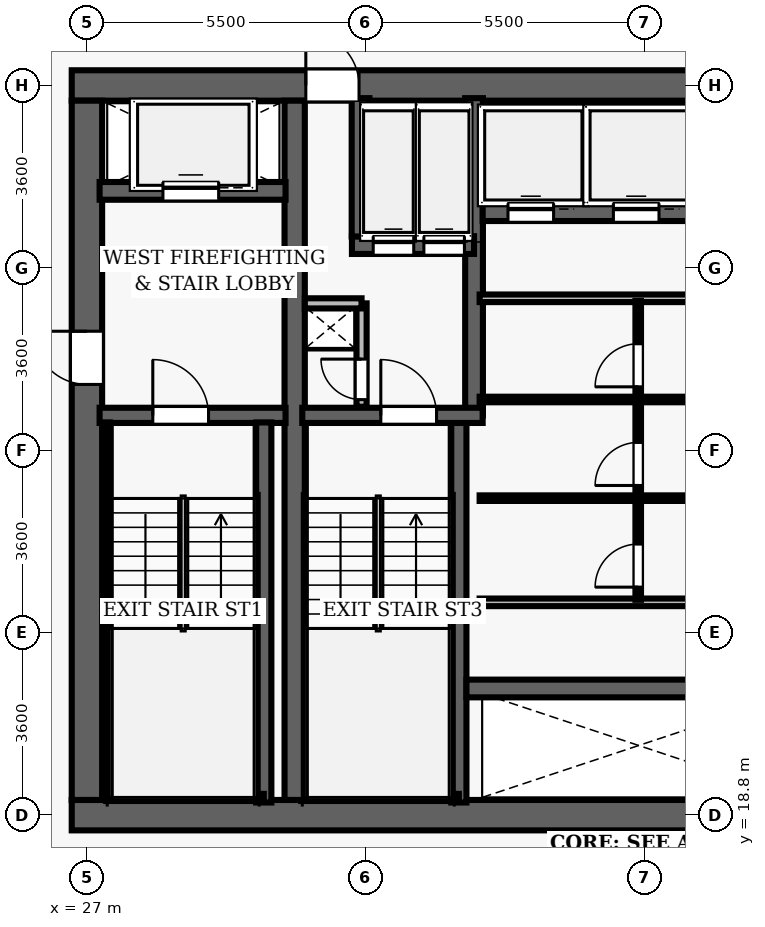
"""IFC4 building model, lengths in metres.
Left out: names, types, materials, properties, quantities, classifications, styles, units other than length and angle.
Written with IfcOpenShell. Run it as: python <this file> out.ifc"""

import sys

from ifc_helpers import new_model, si_unit, direction, frame, frame_2d, origin, place, context, subcontext, project, spatial, rectangle, extrude, element, fill, save


model = new_model("IFC4")
c1 = context("Model", 3, precision=1e-05, world=origin(), true_north=direction((0.0, 1.0)))
c2 = subcontext(c1, "Body", "Model", "MODEL_VIEW")
j1 = project(units=[si_unit("LENGTHUNIT", "METRE"), si_unit("PLANEANGLEUNIT", "RADIAN")], contexts=[c1])
p1 = place(None, origin())
s1 = spatial("IfcSite", under=j1, at=p1, CompositionType="ELEMENT")
p2 = place(p1, origin())
s2 = spatial("IfcBuilding", under=s1, at=p2, CompositionType="ELEMENT")
p3 = place(p2, frame((0.0, 0.0, 65.9)))
s3 = spatial("IfcBuildingStorey", under=s2, at=p3, CompositionType="ELEMENT", Elevation=65.9)
p4 = place(p3, frame((26.7, 18.8, 0.0), z_axis=(0.0, 0.0, 1.0), x_axis=(1.0, 0.0, 0.0)))
e1 = element("IfcWall", 1, at=p4, inside=s3, PredefinedType="SHEAR", context=c2, shape_type="SweptSolid", body=[
    extrude(rectangle(XDim=22.6, YDim=0.6, at=frame_2d((11.3, 0.0))), origin(), (0.0, 0.0, 1.0), 3.5),
])
p5 = place(p4, frame((14.52, 0.0, 0.0)))
e2 = element("IfcOpeningElement", 2, at=p5, cuts=e1, PredefinedType="OPENING", context=c2, shape_type="SweptSolid", body=[
    extrude(rectangle(XDim=1.05, YDim=2.15, at=frame_2d((0.525, 1.075))), frame((0.0, 0.31, 0.0), z_axis=(0.0, -1.0, 0.0), x_axis=(1.0, 0.0, 0.0)), (0.0, 0.0, 1.0), 0.62),
])
p6 = place(p3, frame((26.7, 33.2, 0.0), z_axis=(0.0, 0.0, 1.0), x_axis=(1.0, 0.0, 0.0)))
e3 = element("IfcWall", 3, at=p6, inside=s3, PredefinedType="SHEAR", context=c2, shape_type="SweptSolid", body=[
    extrude(rectangle(XDim=22.6, YDim=0.6, at=frame_2d((11.3, 0.0))), origin(), (0.0, 0.0, 1.0), 3.5),
])
p7 = place(p6, frame((4.62, 0.0, 0.0)))
e4 = element("IfcOpeningElement", 4, at=p7, cuts=e3, PredefinedType="OPENING", context=c2, shape_type="SweptSolid", body=[
    extrude(rectangle(XDim=1.05, YDim=2.15, at=frame_2d((0.525, 1.075))), frame((0.0, 0.31, 0.0), z_axis=(0.0, -1.0, 0.0), x_axis=(1.0, 0.0, 0.0)), (0.0, 0.0, 1.0), 0.62),
])
p8 = place(p6, frame((14.52, 0.0, 0.0)))
e5 = element("IfcOpeningElement", 5, at=p8, cuts=e3, PredefinedType="OPENING", context=c2, shape_type="SweptSolid", body=[
    extrude(rectangle(XDim=1.05, YDim=2.15, at=frame_2d((0.525, 1.075))), frame((0.0, 0.31, 0.0), z_axis=(0.0, -1.0, 0.0), x_axis=(1.0, 0.0, 0.0)), (0.0, 0.0, 1.0), 0.62),
])
p9 = place(p3, frame((27.0, 19.1, 0.0), z_axis=(0.0, 0.0, 1.0), x_axis=(0.0, 1.0, 0.0)))
e6 = element("IfcWall", 6, at=p9, inside=s3, PredefinedType="SHEAR", context=c2, shape_type="SweptSolid", body=[
    extrude(rectangle(XDim=13.8, YDim=0.6, at=frame_2d((6.9, 0.0))), origin(), (0.0, 0.0, 1.0), 3.5),
])
p10 = place(p9, frame((8.2, 0.0, 0.0)))
e7 = element("IfcOpeningElement", 7, at=p10, cuts=e6, PredefinedType="OPENING", context=c2, shape_type="SweptSolid", body=[
    extrude(rectangle(XDim=1.05, YDim=2.15, at=frame_2d((0.525, 1.075))), frame((0.0, 0.31, 0.0), z_axis=(0.0, -1.0, 0.0), x_axis=(1.0, 0.0, 0.0)), (0.0, 0.0, 1.0), 0.62),
])
p11 = place(p3, frame((31.1, 19.1, 0.0), z_axis=(0.0, 0.0, 1.0), x_axis=(0.0, 1.0, 0.0)))
e8 = element("IfcWall", 8, at=p11, inside=s3, PredefinedType="SHEAR", context=c2, shape_type="SweptSolid", body=[
    extrude(rectangle(XDim=13.8, YDim=0.4, at=frame_2d((6.9, 0.0))), origin(), (0.0, 0.0, 1.0), 3.5),
])
p12 = place(p3, frame((27.25, 26.69, 0.0), z_axis=(0.0, 0.0, 1.0), x_axis=(1.0, 0.0, 0.0)))
e9 = element("IfcWall", 9, at=p12, inside=s3, PredefinedType="SHEAR", context=c2, shape_type="SweptSolid", body=[
    extrude(rectangle(XDim=3.67, YDim=0.3, at=frame_2d((1.835, 0.0))), origin(), (0.0, 0.0, 1.0), 3.5),
])
p13 = place(p12, frame((1.05, 0.0, 0.0)))
e10 = element("IfcOpeningElement", 10, at=p13, cuts=e9, PredefinedType="OPENING", context=c2, shape_type="SweptSolid", body=[
    extrude(rectangle(XDim=1.1, YDim=2.15, at=frame_2d((0.55, 1.075))), frame((0.0, 0.16, 0.0), z_axis=(0.0, -1.0, 0.0), x_axis=(1.0, 0.0, 0.0)), (0.0, 0.0, 1.0), 0.32),
])
p14 = place(p3, frame((30.49, 19.05, 0.0), z_axis=(0.0, 0.0, 1.0), x_axis=(0.0, 1.0, 0.0)))
e11 = element("IfcWall", 11, at=p14, inside=s3, PredefinedType="SHEAR", context=c2, shape_type="SweptSolid", body=[
    extrude(rectangle(XDim=7.5, YDim=0.3, at=frame_2d((3.75, 0.0))), origin(), (0.0, 0.0, 1.0), 3.5),
])
p15 = place(p3, frame((27.395, 19.1, 0.0), z_axis=(0.0, 0.0, 1.0), x_axis=(0.0, 1.0, 0.0)))
e12 = element("IfcWall", 12, at=p15, inside=s3, PredefinedType="SHEAR", context=c2, shape_type="SweptSolid", body=[
    extrude(rectangle(XDim=7.45, YDim=0.12, at=frame_2d((3.725, 0.0))), origin(), (0.0, 0.0, 1.0), 3.5),
])
p16 = place(p3, frame((27.395, 19.16, 0.0), z_axis=(0.0, 0.0, 1.0), x_axis=(1.0, 0.0, 0.0)))
e13 = element("IfcWall", 13, at=p16, inside=s3, PredefinedType="SHEAR", context=c2, shape_type="SweptSolid", body=[
    extrude(rectangle(XDim=3.095, YDim=0.12, at=frame_2d((1.547, 0.0))), origin(), (0.0, 0.0, 1.0), 3.5),
])
p17 = place(p3, frame((27.25, 31.12, 0.0), z_axis=(0.0, 0.0, 1.0), x_axis=(1.0, 0.0, 0.0)))
e14 = element("IfcWall", 14, at=p17, inside=s3, PredefinedType="SHEAR", context=c2, shape_type="SweptSolid", body=[
    extrude(rectangle(XDim=3.67, YDim=0.35, at=frame_2d((1.835, 0.0))), origin(), (0.0, 0.0, 1.0), 2.6),
])
p18 = place(p17, frame((1.25, 0.0, 0.0)))
e15 = element("IfcOpeningElement", 15, at=p18, cuts=e14, PredefinedType="OPENING", context=c2, shape_type="SweptSolid", body=[
    extrude(rectangle(XDim=1.1, YDim=2.15, at=frame_2d((0.55, 1.075))), frame((0.0, 0.185, 0.0), z_axis=(0.0, -1.0, 0.0), x_axis=(1.0, 0.0, 0.0)), (0.0, 0.0, 1.0), 0.37),
])
p19 = place(p3, frame((34.34, 19.05, 0.0), z_axis=(0.0, 0.0, 1.0), x_axis=(0.0, 1.0, 0.0)))
e16 = element("IfcWall", 16, at=p19, inside=s3, PredefinedType="SHEAR", context=c2, shape_type="SweptSolid", body=[
    extrude(rectangle(XDim=7.5, YDim=0.3, at=frame_2d((3.75, 0.0))), origin(), (0.0, 0.0, 1.0), 3.5),
])
p20 = place(p3, frame((34.64, 26.69, 0.0), z_axis=(0.0, 0.0, 1.0), x_axis=(0.0, 1.0, 0.0)))
e17 = element("IfcWall", 17, at=p20, inside=s3, PredefinedType="SHEAR", context=c2, shape_type="SweptSolid", body=[
    extrude(rectangle(XDim=6.26, YDim=0.35, at=frame_2d((3.13, 0.0))), origin(), (0.0, 0.0, 1.0), 3.5),
])
p21 = place(p3, frame((31.25, 26.69, 0.0), z_axis=(0.0, 0.0, 1.0), x_axis=(1.0, 0.0, 0.0)))
e18 = element("IfcWall", 18, at=p21, inside=s3, PredefinedType="SHEAR", context=c2, shape_type="SweptSolid", body=[
    extrude(rectangle(XDim=3.56, YDim=0.3, at=frame_2d((1.78, 0.0))), origin(), (0.0, 0.0, 1.0), 3.5),
])
p22 = place(p21, frame((1.55, 0.0, 0.0)))
e19 = element("IfcOpeningElement", 19, at=p22, cuts=e18, PredefinedType="OPENING", context=c2, shape_type="SweptSolid", body=[
    extrude(rectangle(XDim=1.1, YDim=2.15, at=frame_2d((0.55, 1.075))), frame((0.0, 0.16, 0.0), z_axis=(0.0, -1.0, 0.0), x_axis=(1.0, 0.0, 0.0)), (0.0, 0.0, 1.0), 0.32),
])
p23 = place(p3, frame((31.3, 19.16, 0.0), z_axis=(0.0, 0.0, 1.0), x_axis=(1.0, 0.0, 0.0)))
e20 = element("IfcWall", 20, at=p23, inside=s3, PredefinedType="SHEAR", context=c2, shape_type="SweptSolid", body=[
    extrude(rectangle(XDim=3.04, YDim=0.12, at=frame_2d((1.52, 0.0))), origin(), (0.0, 0.0, 1.0), 3.5),
])
p24 = place(p3, frame((32.23, 30.05, 0.0), z_axis=(0.0, 0.0, 1.0), x_axis=(1.0, 0.0, 0.0)))
e21 = element("IfcWall", 21, at=p24, inside=s3, PredefinedType="SHEAR", context=c2, shape_type="SweptSolid", body=[
    extrude(rectangle(XDim=2.41, YDim=0.35, at=frame_2d((1.205, 0.0))), origin(), (0.0, 0.0, 1.0), 2.6),
])
p25 = place(p24, frame((0.42, 0.0, 0.0)))
e22 = element("IfcOpeningElement", 22, at=p25, cuts=e21, PredefinedType="OPENING", context=c2, shape_type="SweptSolid", body=[
    extrude(rectangle(XDim=0.8, YDim=2.15, at=frame_2d((0.4, 1.075))), frame((0.0, 0.185, 0.0), z_axis=(0.0, -1.0, 0.0), x_axis=(1.0, 0.0, 0.0)), (0.0, 0.0, 1.0), 0.37),
])
p26 = place(p24, frame((1.42, 0.0, 0.0)))
e23 = element("IfcOpeningElement", 23, at=p26, cuts=e21, PredefinedType="OPENING", context=c2, shape_type="SweptSolid", body=[
    extrude(rectangle(XDim=0.8, YDim=2.15, at=frame_2d((0.4, 1.075))), frame((0.0, 0.185, 0.0), z_axis=(0.0, -1.0, 0.0), x_axis=(1.0, 0.0, 0.0)), (0.0, 0.0, 1.0), 0.37),
])
p27 = place(p3, frame((32.4, 30.22, 0.0), z_axis=(0.0, 0.0, 1.0), x_axis=(0.0, 1.0, 0.0)))
e24 = element("IfcWall", 24, at=p27, inside=s3, PredefinedType="SHEAR", context=c2, shape_type="SweptSolid", body=[
    extrude(rectangle(XDim=2.73, YDim=0.35, at=frame_2d((1.365, 0.0))), origin(), (0.0, 0.0, 1.0), 2.6),
])
p28 = place(p3, frame((32.42, 26.86, 0.0), z_axis=(0.0, 0.0, 1.0), x_axis=(0.0, 1.0, 0.0)))
e25 = element("IfcWall", 25, at=p28, inside=s3, PredefinedType="PARTITIONING", context=c2, shape_type="SweptSolid", body=[
    extrude(rectangle(XDim=2.04, YDim=0.2, at=frame_2d((1.02, 0.0))), origin(), (0.0, 0.0, 1.0), 2.6),
])
p29 = place(p28, frame((0.14, 0.0, 0.0)))
e26 = element("IfcOpeningElement", 26, at=p29, cuts=e25, PredefinedType="OPENING", context=c2, shape_type="SweptSolid", body=[
    extrude(rectangle(XDim=0.8, YDim=2.05, at=frame_2d((0.4, 1.025))), frame((0.0, 0.11, 0.0), z_axis=(0.0, -1.0, 0.0), x_axis=(1.0, 0.0, 0.0)), (0.0, 0.0, 1.0), 0.22),
])
p30 = place(p3, frame((31.3, 28.9, 0.0), z_axis=(0.0, 0.0, 1.0), x_axis=(1.0, 0.0, 0.0)))
e27 = element("IfcWall", 27, at=p30, inside=s3, PredefinedType="PARTITIONING", context=c2, shape_type="SweptSolid", body=[
    extrude(rectangle(XDim=1.12, YDim=0.2, at=frame_2d((0.56, 0.0))), origin(), (0.0, 0.0, 1.0), 2.6),
])
p31 = place(p3, frame((34.81, 30.7, 0.0), z_axis=(0.0, 0.0, 1.0), x_axis=(1.0, 0.0, 0.0)))
e28 = element("IfcWall", 28, at=p31, inside=s3, PredefinedType="SHEAR", context=c2, shape_type="SweptSolid", body=[
    extrude(rectangle(XDim=6.36, YDim=0.35, at=frame_2d((3.18, 0.0))), origin(), (0.0, 0.0, 1.0), 2.6),
])
p32 = place(p31, frame((0.5, 0.0, 0.0)))
e29 = element("IfcOpeningElement", 29, at=p32, cuts=e28, PredefinedType="OPENING", context=c2, shape_type="SweptSolid", body=[
    extrude(rectangle(XDim=0.9, YDim=2.15, at=frame_2d((0.45, 1.075))), frame((0.0, 0.185, 0.0), z_axis=(0.0, -1.0, 0.0), x_axis=(1.0, 0.0, 0.0)), (0.0, 0.0, 1.0), 0.37),
])
p33 = place(p31, frame((2.58, 0.0, 0.0)))
e30 = element("IfcOpeningElement", 30, at=p33, cuts=e28, PredefinedType="OPENING", context=c2, shape_type="SweptSolid", body=[
    extrude(rectangle(XDim=0.9, YDim=2.15, at=frame_2d((0.45, 1.075))), frame((0.0, 0.185, 0.0), z_axis=(0.0, -1.0, 0.0), x_axis=(1.0, 0.0, 0.0)), (0.0, 0.0, 1.0), 0.37),
])
p34 = place(p31, frame((4.66, 0.0, 0.0)))
e31 = element("IfcOpeningElement", 31, at=p34, cuts=e28, PredefinedType="OPENING", context=c2, shape_type="SweptSolid", body=[
    extrude(rectangle(XDim=0.9, YDim=2.15, at=frame_2d((0.45, 1.075))), frame((0.0, 0.185, 0.0), z_axis=(0.0, -1.0, 0.0), x_axis=(1.0, 0.0, 0.0)), (0.0, 0.0, 1.0), 0.37),
])
p35 = place(p3, frame((34.49, 21.3, 0.0), z_axis=(0.0, 0.0, 1.0), x_axis=(1.0, 0.0, 0.0)))
e32 = element("IfcWall", 32, at=p35, inside=s3, PredefinedType="SHEAR", context=c2, shape_type="SweptSolid", body=[
    extrude(rectangle(XDim=6.68, YDim=0.35, at=frame_2d((3.34, 0.0))), origin(), (0.0, 0.0, 1.0), 2.6),
])
for number, where, z_axis, x_axis in (
    (33, (34.75, 29.0, 0.0), (0.0, 0.0, 1.0), (1.0, 0.0, 0.0)),
    (34, (34.75, 23.0, 0.0), (0.0, 0.0, 1.0), (1.0, 0.0, 0.0)),
):
    element("IfcWall", number, at=place(p3, frame(where, z_axis=z_axis, x_axis=x_axis)), inside=s3, PredefinedType="PARTITIONING", context=c2, shape_type="SweptSolid", body=[
        extrude(rectangle(XDim=6.25, YDim=0.15, at=frame_2d((3.125, 0.0))), origin(), (0.0, 0.0, 1.0), 2.6),
    ])
p36 = place(p3, frame((37.88, 23.05, 0.0), z_axis=(0.0, 0.0, 1.0), x_axis=(0.0, 1.0, 0.0)))
e35 = element("IfcWall", 35, at=p36, inside=s3, PredefinedType="PARTITIONING", context=c2, shape_type="SweptSolid", body=[
    extrude(rectangle(XDim=5.9, YDim=0.11, at=frame_2d((2.95, 0.0))), origin(), (0.0, 0.0, 1.0), 2.6),
])
p37 = place(p36, frame((0.25, 0.0, 0.0)))
e36 = element("IfcOpeningElement", 36, at=p37, cuts=e35, PredefinedType="OPENING", context=c2, shape_type="SweptSolid", body=[
    extrude(rectangle(XDim=0.85, YDim=2.1, at=frame_2d((0.425, 1.05))), frame((0.0, 0.065, 0.0), z_axis=(0.0, -1.0, 0.0), x_axis=(1.0, 0.0, 0.0)), (0.0, 0.0, 1.0), 0.13),
])
p38 = place(p36, frame((2.256, 0.0, 0.0)))
e37 = element("IfcOpeningElement", 37, at=p38, cuts=e35, PredefinedType="OPENING", context=c2, shape_type="SweptSolid", body=[
    extrude(rectangle(XDim=0.85, YDim=2.1, at=frame_2d((0.425, 1.05))), frame((0.0, 0.065, 0.0), z_axis=(0.0, -1.0, 0.0), x_axis=(1.0, 0.0, 0.0)), (0.0, 0.0, 1.0), 0.13),
])
p39 = place(p36, frame((4.203, 0.0, 0.0)))
e38 = element("IfcOpeningElement", 38, at=p39, cuts=e35, PredefinedType="OPENING", context=c2, shape_type="SweptSolid", body=[
    extrude(rectangle(XDim=0.85, YDim=2.1, at=frame_2d((0.425, 1.05))), frame((0.0, 0.065, 0.0), z_axis=(0.0, -1.0, 0.0), x_axis=(1.0, 0.0, 0.0)), (0.0, 0.0, 1.0), 0.13),
])
for number, where, z_axis, x_axis in (
    (39, (34.75, 25.056, 0.0), (0.0, 0.0, 1.0), (1.0, 0.0, 0.0)),
    (40, (34.75, 27.003, 0.0), (0.0, 0.0, 1.0), (1.0, 0.0, 0.0)),
):
    element("IfcWall", number, at=place(p3, frame(where, z_axis=z_axis, x_axis=x_axis)), inside=s3, PredefinedType="PARTITIONING", context=c2, shape_type="SweptSolid", body=[
        extrude(rectangle(XDim=6.25, YDim=0.11, at=frame_2d((3.125, 0.0))), origin(), (0.0, 0.0, 1.0), 2.6),
    ])
p40 = place(p13, origin())
e41 = element("IfcDoor", 41, at=p40, inside=s3, OperationType="SINGLE_SWING_LEFT", PredefinedType="DOOR", context=c2, shape_type="SweptSolid", body=[
    extrude(rectangle(XDim=1.1, YDim=2.15, at=frame_2d((0.55, 1.075))), frame((0.0, 0.025, 0.0), z_axis=(0.0, -1.0, 0.0), x_axis=(1.0, 0.0, 0.0)), (0.0, 0.0, 1.0), 0.05),
])
fill(e10, e41)
p41 = place(p10, origin())
e42 = element("IfcDoor", 42, at=p41, inside=s3, OperationType="SINGLE_SWING_RIGHT", PredefinedType="DOOR", context=c2, shape_type="SweptSolid", body=[
    extrude(rectangle(XDim=1.05, YDim=2.15, at=frame_2d((0.525, 1.075))), frame((0.0, 0.025, 0.0), z_axis=(0.0, -1.0, 0.0), x_axis=(1.0, 0.0, 0.0)), (0.0, 0.0, 1.0), 0.05),
])
fill(e7, e42)
p42 = place(p22, origin())
e43 = element("IfcDoor", 43, at=p42, inside=s3, OperationType="SINGLE_SWING_LEFT", PredefinedType="DOOR", context=c2, shape_type="SweptSolid", body=[
    extrude(rectangle(XDim=1.1, YDim=2.15, at=frame_2d((0.55, 1.075))), frame((0.0, 0.025, 0.0), z_axis=(0.0, -1.0, 0.0), x_axis=(1.0, 0.0, 0.0)), (0.0, 0.0, 1.0), 0.05),
])
fill(e19, e43)
p43 = place(p29, origin())
e44 = element("IfcDoor", 44, at=p43, inside=s3, OperationType="SINGLE_SWING_RIGHT", PredefinedType="DOOR", context=c2, shape_type="SweptSolid", body=[
    extrude(rectangle(XDim=0.8, YDim=2.05, at=frame_2d((0.4, 1.025))), frame((0.0, 0.025, 0.0), z_axis=(0.0, -1.0, 0.0), x_axis=(1.0, 0.0, 0.0)), (0.0, 0.0, 1.0), 0.05),
])
fill(e26, e44)
p44 = place(p7, origin())
e45 = element("IfcDoor", 45, at=p44, inside=s3, OperationType="SINGLE_SWING_LEFT", PredefinedType="DOOR", context=c2, shape_type="SweptSolid", body=[
    extrude(rectangle(XDim=1.05, YDim=2.15, at=frame_2d((0.525, 1.075))), frame((0.0, 0.025, 0.0), z_axis=(0.0, -1.0, 0.0), x_axis=(1.0, 0.0, 0.0)), (0.0, 0.0, 1.0), 0.05),
])
fill(e4, e45)
p45 = place(p37, origin())
e46 = element("IfcDoor", 46, at=p45, inside=s3, OperationType="SINGLE_SWING_LEFT", PredefinedType="DOOR", context=c2, shape_type="SweptSolid", body=[
    extrude(rectangle(XDim=0.85, YDim=2.1, at=frame_2d((0.425, 1.05))), frame((0.0, 0.025, 0.0), z_axis=(0.0, -1.0, 0.0), x_axis=(1.0, 0.0, 0.0)), (0.0, 0.0, 1.0), 0.05),
])
fill(e36, e46)
p46 = place(p38, origin())
e47 = element("IfcDoor", 47, at=p46, inside=s3, OperationType="SINGLE_SWING_LEFT", PredefinedType="DOOR", context=c2, shape_type="SweptSolid", body=[
    extrude(rectangle(XDim=0.85, YDim=2.1, at=frame_2d((0.425, 1.05))), frame((0.0, 0.025, 0.0), z_axis=(0.0, -1.0, 0.0), x_axis=(1.0, 0.0, 0.0)), (0.0, 0.0, 1.0), 0.05),
])
fill(e37, e47)
p47 = place(p39, origin())
e48 = element("IfcDoor", 48, at=p47, inside=s3, OperationType="SINGLE_SWING_LEFT", PredefinedType="DOOR", context=c2, shape_type="SweptSolid", body=[
    extrude(rectangle(XDim=0.85, YDim=2.1, at=frame_2d((0.425, 1.05))), frame((0.0, 0.025, 0.0), z_axis=(0.0, -1.0, 0.0), x_axis=(1.0, 0.0, 0.0)), (0.0, 0.0, 1.0), 0.05),
])
fill(e38, e48)
p48 = place(p32, origin())
e49 = element("IfcDoor", 49, at=p48, inside=s3, OperationType="SLIDING_TO_LEFT", PredefinedType="DOOR", context=c2, shape_type="SweptSolid", body=[
    extrude(rectangle(XDim=0.9, YDim=2.15, at=frame_2d((0.45, 1.075))), frame((0.0, 0.025, 0.0), z_axis=(0.0, -1.0, 0.0), x_axis=(1.0, 0.0, 0.0)), (0.0, 0.0, 1.0), 0.05),
])
fill(e29, e49)
p49 = place(p33, origin())
e50 = element("IfcDoor", 50, at=p49, inside=s3, OperationType="SLIDING_TO_LEFT", PredefinedType="DOOR", context=c2, shape_type="SweptSolid", body=[
    extrude(rectangle(XDim=0.9, YDim=2.15, at=frame_2d((0.45, 1.075))), frame((0.0, 0.025, 0.0), z_axis=(0.0, -1.0, 0.0), x_axis=(1.0, 0.0, 0.0)), (0.0, 0.0, 1.0), 0.05),
])
fill(e30, e50)
p50 = place(p18, origin())
e51 = element("IfcDoor", 51, at=p50, inside=s3, OperationType="SLIDING_TO_LEFT", PredefinedType="DOOR", context=c2, shape_type="SweptSolid", body=[
    extrude(rectangle(XDim=1.1, YDim=2.15, at=frame_2d((0.55, 1.075))), frame((0.0, 0.025, 0.0), z_axis=(0.0, -1.0, 0.0), x_axis=(1.0, 0.0, 0.0)), (0.0, 0.0, 1.0), 0.05),
])
fill(e15, e51)
p51 = place(p25, origin())
e52 = element("IfcDoor", 52, at=p51, inside=s3, OperationType="SLIDING_TO_LEFT", PredefinedType="DOOR", context=c2, shape_type="SweptSolid", body=[
    extrude(rectangle(XDim=0.8, YDim=2.15, at=frame_2d((0.4, 1.075))), frame((0.0, 0.025, 0.0), z_axis=(0.0, -1.0, 0.0), x_axis=(1.0, 0.0, 0.0)), (0.0, 0.0, 1.0), 0.05),
])
fill(e22, e52)
p52 = place(p26, origin())
e53 = element("IfcDoor", 53, at=p52, inside=s3, OperationType="SLIDING_TO_LEFT", PredefinedType="DOOR", context=c2, shape_type="SweptSolid", body=[
    extrude(rectangle(XDim=0.8, YDim=2.15, at=frame_2d((0.4, 1.075))), frame((0.0, 0.025, 0.0), z_axis=(0.0, -1.0, 0.0), x_axis=(1.0, 0.0, 0.0)), (0.0, 0.0, 1.0), 0.05),
])
fill(e23, e53)
save(model, sys.argv[1])
